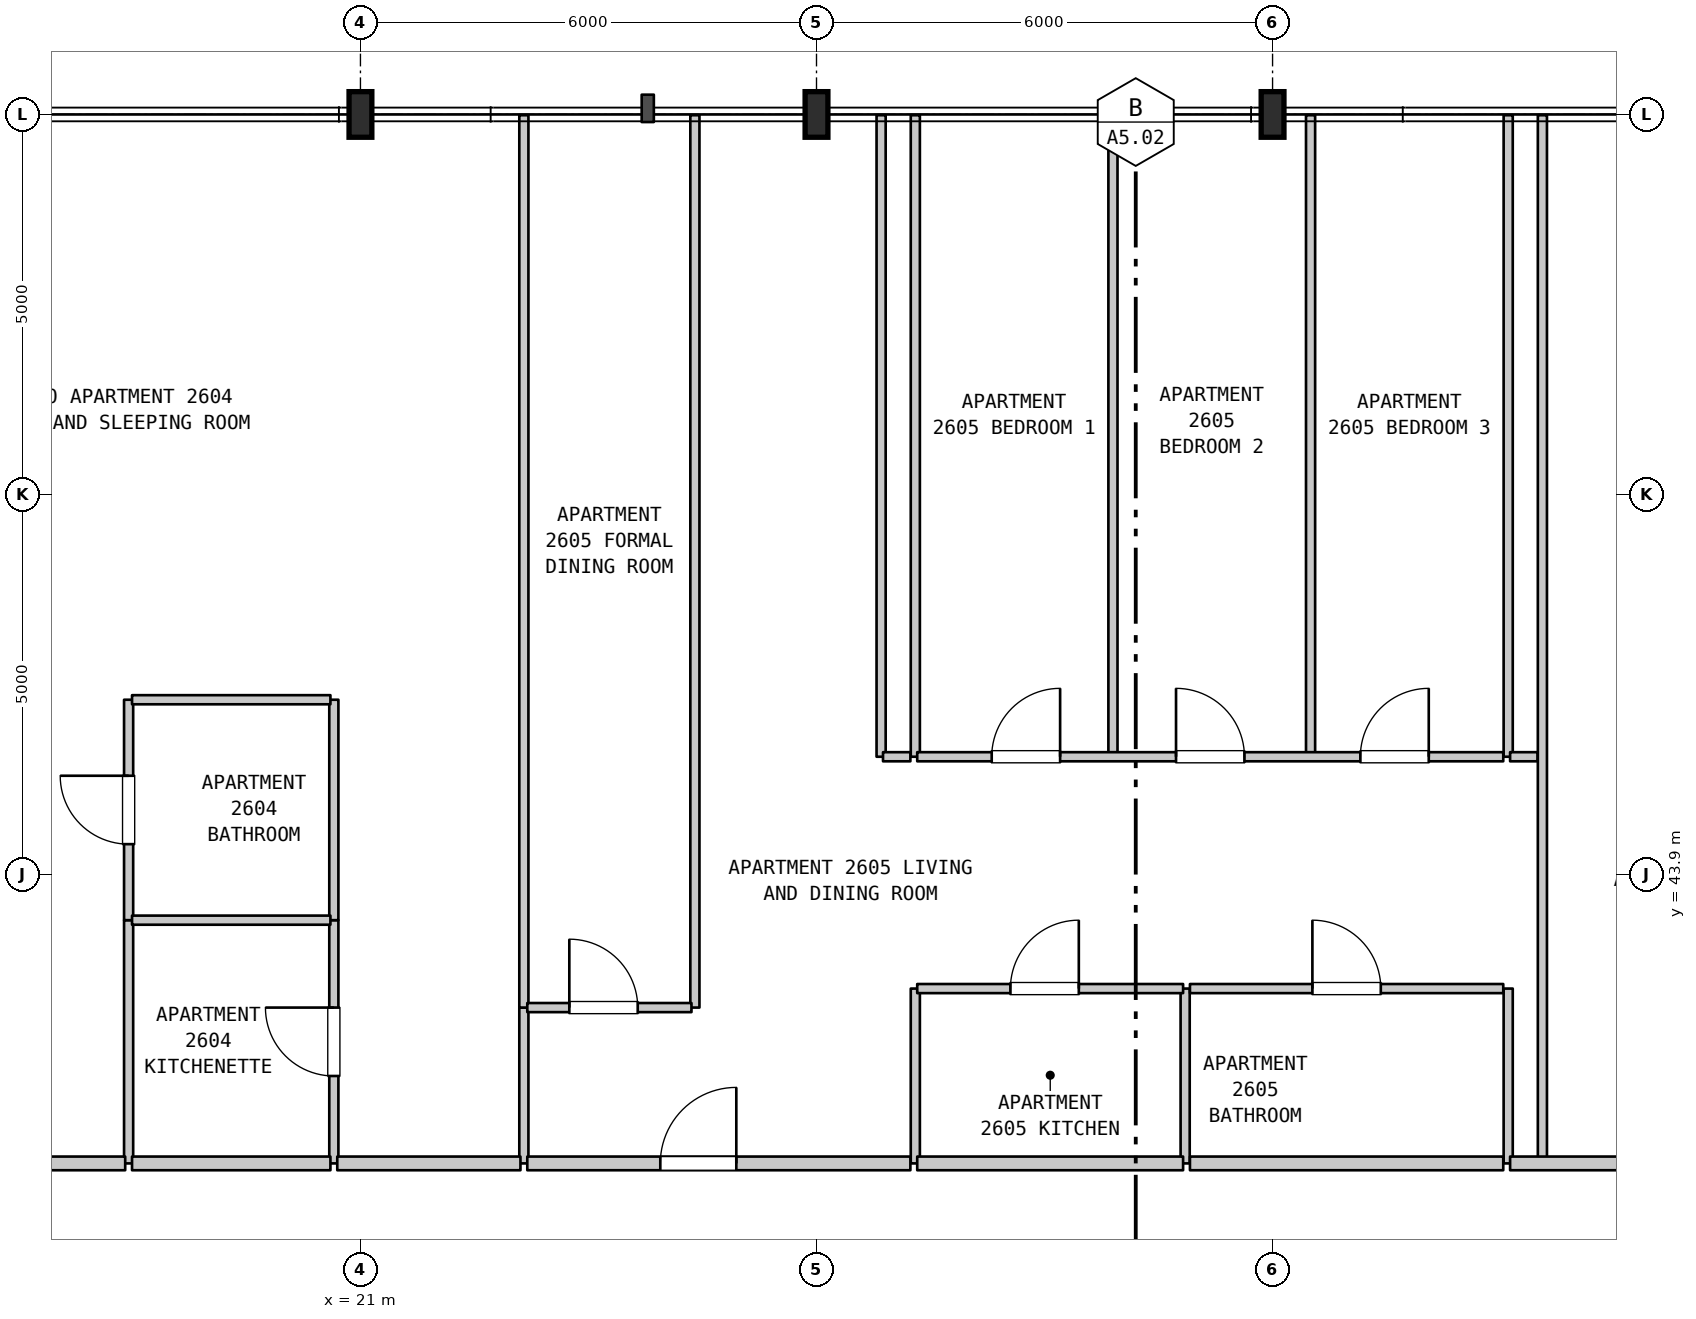
"""IFC4 building model, lengths in metres.
Left out: names, types, materials, properties, quantities, classifications, styles, units other than length and angle.
Written with IfcOpenShell. Run it as: python <this file> out.ifc"""

import sys

from ifc_helpers import new_model, si_unit, direction, frame, frame_2d, origin, origin_2d, place, context, subcontext, project, spatial, rectangle, i_section, extrude, element, fill, save


model = new_model("IFC4")
c1 = context("Model", 3, precision=1e-05, world=origin(), true_north=direction((0.0, 1.0)))
c2 = subcontext(c1, "Body", "Model", "MODEL_VIEW")
j1 = project(units=[si_unit("LENGTHUNIT", "METRE"), si_unit("PLANEANGLEUNIT", "RADIAN")], contexts=[c1])
p1 = place(None, origin())
s1 = spatial("IfcSite", under=j1, at=p1, CompositionType="ELEMENT")
p2 = place(p1, origin())
s2 = spatial("IfcBuilding", under=s1, at=p2, CompositionType="ELEMENT")
p3 = place(p2, frame((0.0, 0.0, 109.4)))
s3 = spatial("IfcBuildingStorey", under=s2, at=p3, CompositionType="ELEMENT", Elevation=109.4)
for number, where, z_axis, x_axis in (
    (1, (21.0, 53.9, 0.0), (0.0, 0.0, 1.0), (1.0, 0.0, 0.0)),
    (2, (27.0, 53.9, 0.0), (0.0, 0.0, 1.0), (1.0, 0.0, 0.0)),
    (3, (33.0, 53.9, 0.0), (0.0, 0.0, 1.0), (1.0, 0.0, 0.0)),
):
    element("IfcColumn", number, at=place(p3, frame(where, z_axis=z_axis, x_axis=x_axis)), inside=s3, PredefinedType="COLUMN", context=c2, shape_type="SweptSolid", body=[
        extrude(i_section(OverallWidth=0.3, OverallDepth=0.6, WebThickness=0.015, FlangeThickness=0.03, FilletRadius=0.027, at=origin_2d()), origin(), (0.0, 0.0, 1.0), 3.7),
    ])
p4 = place(p3, frame((17.95, 40.1, 0.0), z_axis=(0.0, 0.0, 1.0), x_axis=(0.0, 1.0, 0.0)))
e4 = element("IfcWall", 4, at=p4, inside=s3, PredefinedType="PARTITIONING", context=c2, shape_type="SweptSolid", body=[
    extrude(rectangle(XDim=3.2, YDim=0.12, at=frame_2d((1.6, 0.0))), origin(), (0.0, 0.0, 1.0), 3.385),
])
p5 = place(p3, frame((17.95, 43.3, 0.0), z_axis=(0.0, 0.0, 1.0), x_axis=(0.0, 1.0, 0.0)))
e5 = element("IfcWall", 5, at=p5, inside=s3, PredefinedType="PARTITIONING", context=c2, shape_type="SweptSolid", body=[
    extrude(rectangle(XDim=2.9, YDim=0.12, at=frame_2d((1.45, 0.0))), origin(), (0.0, 0.0, 1.0), 3.385),
])
p6 = place(p5, frame((1.0, 0.0, 0.0)))
e6 = element("IfcOpeningElement", 6, at=p6, cuts=e5, PredefinedType="OPENING", context=c2, shape_type="SweptSolid", body=[
    extrude(rectangle(XDim=0.9, YDim=2.1, at=frame_2d((0.45, 1.05))), frame((0.0, 0.07, 0.0), z_axis=(0.0, -1.0, 0.0), x_axis=(1.0, 0.0, 0.0)), (0.0, 0.0, 1.0), 0.14),
])
p7 = place(p3, frame((20.65, 40.1, 0.0), z_axis=(0.0, 0.0, 1.0), x_axis=(0.0, 1.0, 0.0)))
e7 = element("IfcWall", 7, at=p7, inside=s3, PredefinedType="PARTITIONING", context=c2, shape_type="SweptSolid", body=[
    extrude(rectangle(XDim=3.2, YDim=0.12, at=frame_2d((1.6, 0.0))), origin(), (0.0, 0.0, 1.0), 3.385),
])
p8 = place(p7, frame((1.15, 0.0, 0.0)))
e8 = element("IfcOpeningElement", 8, at=p8, cuts=e7, PredefinedType="OPENING", context=c2, shape_type="SweptSolid", body=[
    extrude(rectangle(XDim=0.9, YDim=2.15, at=frame_2d((0.45, 1.075))), frame((0.0, 0.07, 0.0), z_axis=(0.0, -1.0, 0.0), x_axis=(1.0, 0.0, 0.0)), (0.0, 0.0, 1.0), 0.14),
])
p9 = place(p3, frame((20.65, 43.3, 0.0), z_axis=(0.0, 0.0, 1.0), x_axis=(0.0, 1.0, 0.0)))
e9 = element("IfcWall", 9, at=p9, inside=s3, PredefinedType="PARTITIONING", context=c2, shape_type="SweptSolid", body=[
    extrude(rectangle(XDim=2.9, YDim=0.12, at=frame_2d((1.45, 0.0))), origin(), (0.0, 0.0, 1.0), 3.385),
])
p10 = place(p3, frame((23.15, 40.1, 0.0), z_axis=(0.0, 0.0, 1.0), x_axis=(0.0, 1.0, 0.0)))
e10 = element("IfcWall", 10, at=p10, inside=s3, PredefinedType="PARTITIONING", context=c2, shape_type="SweptSolid", body=[
    extrude(rectangle(XDim=2.05, YDim=0.12, at=frame_2d((1.025, 0.0))), origin(), (0.0, 0.0, 1.0), 3.385),
])
for number, where, z_axis, x_axis in (
    (11, (23.15, 42.15, 0.0), (0.0, 0.0, 1.0), (0.0, 1.0, 0.0)),
    (12, (25.4, 42.15, 0.0), (0.0, 0.0, 1.0), (0.0, 1.0, 0.0)),
):
    element("IfcWall", number, at=place(p3, frame(where, z_axis=z_axis, x_axis=x_axis)), inside=s3, PredefinedType="PARTITIONING", context=c2, shape_type="SweptSolid", body=[
        extrude(rectangle(XDim=11.74, YDim=0.12, at=frame_2d((5.87, 0.0))), origin(), (0.0, 0.0, 1.0), 3.385),
    ])
p11 = place(p3, frame((27.85, 45.45, 0.0), z_axis=(0.0, 0.0, 1.0), x_axis=(0.0, 1.0, 0.0)))
e13 = element("IfcWall", 13, at=p11, inside=s3, PredefinedType="PARTITIONING", context=c2, shape_type="SweptSolid", body=[
    extrude(rectangle(XDim=8.44, YDim=0.12, at=frame_2d((4.22, 0.0))), origin(), (0.0, 0.0, 1.0), 3.385),
])
p12 = place(p3, frame((28.3, 40.1, 0.0), z_axis=(0.0, 0.0, 1.0), x_axis=(0.0, 1.0, 0.0)))
e14 = element("IfcWall", 14, at=p12, inside=s3, PredefinedType="PARTITIONING", context=c2, shape_type="SweptSolid", body=[
    extrude(rectangle(XDim=2.3, YDim=0.12, at=frame_2d((1.15, 0.0))), origin(), (0.0, 0.0, 1.0), 3.385),
])
for number, where, z_axis, x_axis in (
    (15, (28.3, 45.45, 0.0), (0.0, 0.0, 1.0), (0.0, 1.0, 0.0)),
    (16, (30.9, 45.45, 0.0), (0.0, 0.0, 1.0), (0.0, 1.0, 0.0)),
):
    element("IfcWall", number, at=place(p3, frame(where, z_axis=z_axis, x_axis=x_axis)), inside=s3, PredefinedType="PARTITIONING", context=c2, shape_type="SweptSolid", body=[
        extrude(rectangle(XDim=8.44, YDim=0.12, at=frame_2d((4.22, 0.0))), origin(), (0.0, 0.0, 1.0), 3.385),
    ])
p13 = place(p3, frame((31.85, 40.1, 0.0), z_axis=(0.0, 0.0, 1.0), x_axis=(0.0, 1.0, 0.0)))
e17 = element("IfcWall", 17, at=p13, inside=s3, PredefinedType="PARTITIONING", context=c2, shape_type="SweptSolid", body=[
    extrude(rectangle(XDim=2.3, YDim=0.12, at=frame_2d((1.15, 0.0))), origin(), (0.0, 0.0, 1.0), 3.385),
])
p14 = place(p3, frame((33.5, 45.45, 0.0), z_axis=(0.0, 0.0, 1.0), x_axis=(0.0, 1.0, 0.0)))
e18 = element("IfcWall", 18, at=p14, inside=s3, PredefinedType="PARTITIONING", context=c2, shape_type="SweptSolid", body=[
    extrude(rectangle(XDim=8.44, YDim=0.12, at=frame_2d((4.22, 0.0))), origin(), (0.0, 0.0, 1.0), 3.385),
])
p15 = place(p3, frame((36.1, 40.1, 0.0), z_axis=(0.0, 0.0, 1.0), x_axis=(0.0, 1.0, 0.0)))
e19 = element("IfcWall", 19, at=p15, inside=s3, PredefinedType="PARTITIONING", context=c2, shape_type="SweptSolid", body=[
    extrude(rectangle(XDim=2.3, YDim=0.12, at=frame_2d((1.15, 0.0))), origin(), (0.0, 0.0, 1.0), 3.385),
])
p16 = place(p3, frame((36.1, 45.45, 0.0), z_axis=(0.0, 0.0, 1.0), x_axis=(0.0, 1.0, 0.0)))
e20 = element("IfcWall", 20, at=p16, inside=s3, PredefinedType="PARTITIONING", context=c2, shape_type="SweptSolid", body=[
    extrude(rectangle(XDim=8.44, YDim=0.12, at=frame_2d((4.22, 0.0))), origin(), (0.0, 0.0, 1.0), 3.385),
])
p17 = place(p3, frame((36.55, 40.1, 0.0), z_axis=(0.0, 0.0, 1.0), x_axis=(0.0, 1.0, 0.0)))
e21 = element("IfcWall", 21, at=p17, inside=s3, PredefinedType="PARTITIONING", context=c2, shape_type="SweptSolid", body=[
    extrude(rectangle(XDim=13.79, YDim=0.12, at=frame_2d((6.895, 0.0))), origin(), (0.0, 0.0, 1.0), 3.385),
])
p18 = place(p3, frame((12.875, 40.1, 0.0), z_axis=(0.0, 0.0, 1.0), x_axis=(1.0, 0.0, 0.0)))
e22 = element("IfcWall", 22, at=p18, inside=s3, PredefinedType="STANDARD", context=c2, shape_type="SweptSolid", body=[
    extrude(rectangle(XDim=5.03, YDim=0.18, at=frame_2d((2.515, 0.0))), origin(), (0.0, 0.0, 1.0), 3.385),
])
p19 = place(p18, frame((2.0, 0.0, 0.0)))
e23 = element("IfcOpeningElement", 23, at=p19, cuts=e22, PredefinedType="OPENING", context=c2, shape_type="SweptSolid", body=[
    extrude(rectangle(XDim=1.0, YDim=2.15, at=frame_2d((0.5, 1.075))), frame((0.0, 0.1, 0.0), z_axis=(0.0, -1.0, 0.0), x_axis=(1.0, 0.0, 0.0)), (0.0, 0.0, 1.0), 0.2),
])
p20 = place(p3, frame((17.995, 40.1, 0.0), z_axis=(0.0, 0.0, 1.0), x_axis=(1.0, 0.0, 0.0)))
e24 = element("IfcWall", 24, at=p20, inside=s3, PredefinedType="STANDARD", context=c2, shape_type="SweptSolid", body=[
    extrude(rectangle(XDim=2.61, YDim=0.18, at=frame_2d((1.305, 0.0))), origin(), (0.0, 0.0, 1.0), 3.385),
])
p21 = place(p3, frame((20.695, 40.1, 0.0), z_axis=(0.0, 0.0, 1.0), x_axis=(1.0, 0.0, 0.0)))
e25 = element("IfcWall", 25, at=p21, inside=s3, PredefinedType="STANDARD", context=c2, shape_type="SweptSolid", body=[
    extrude(rectangle(XDim=2.41, YDim=0.18, at=frame_2d((1.205, 0.0))), origin(), (0.0, 0.0, 1.0), 3.385),
])
p22 = place(p3, frame((23.195, 40.1, 0.0), z_axis=(0.0, 0.0, 1.0), x_axis=(1.0, 0.0, 0.0)))
e26 = element("IfcWall", 26, at=p22, inside=s3, PredefinedType="STANDARD", context=c2, shape_type="SweptSolid", body=[
    extrude(rectangle(XDim=5.04, YDim=0.18, at=frame_2d((2.52, 0.0))), origin(), (0.0, 0.0, 1.0), 3.385),
])
p23 = place(p22, frame((1.75, 0.0, 0.0)))
e27 = element("IfcOpeningElement", 27, at=p23, cuts=e26, PredefinedType="OPENING", context=c2, shape_type="SweptSolid", body=[
    extrude(rectangle(XDim=1.0, YDim=2.15, at=frame_2d((0.5, 1.075))), frame((0.0, 0.1, 0.0), z_axis=(0.0, -1.0, 0.0), x_axis=(1.0, 0.0, 0.0)), (0.0, 0.0, 1.0), 0.2),
])
p24 = place(p3, frame((28.325, 40.1, 0.0), z_axis=(0.0, 0.0, 1.0), x_axis=(1.0, 0.0, 0.0)))
e28 = element("IfcWall", 28, at=p24, inside=s3, PredefinedType="STANDARD", context=c2, shape_type="SweptSolid", body=[
    extrude(rectangle(XDim=3.498, YDim=0.18, at=frame_2d((1.749, 0.0))), origin(), (0.0, 0.0, 1.0), 3.385),
])
p25 = place(p3, frame((31.913, 40.1, 0.0), z_axis=(0.0, 0.0, 1.0), x_axis=(1.0, 0.0, 0.0)))
e29 = element("IfcWall", 29, at=p25, inside=s3, PredefinedType="STANDARD", context=c2, shape_type="SweptSolid", body=[
    extrude(rectangle(XDim=4.122, YDim=0.18, at=frame_2d((2.061, 0.0))), origin(), (0.0, 0.0, 1.0), 3.385),
])
p26 = place(p3, frame((36.125, 40.1, 0.0), z_axis=(0.0, 0.0, 1.0), x_axis=(1.0, 0.0, 0.0)))
e30 = element("IfcWall", 30, at=p26, inside=s3, PredefinedType="STANDARD", context=c2, shape_type="SweptSolid", body=[
    extrude(rectangle(XDim=5.14, YDim=0.18, at=frame_2d((2.57, 0.0))), origin(), (0.0, 0.0, 1.0), 3.385),
])
p27 = place(p26, frame((2.198, 0.0, 0.0)))
e31 = element("IfcOpeningElement", 31, at=p27, cuts=e30, PredefinedType="OPENING", context=c2, shape_type="SweptSolid", body=[
    extrude(rectangle(XDim=1.0, YDim=2.15, at=frame_2d((0.5, 1.075))), frame((0.0, 0.1, 0.0), z_axis=(0.0, -1.0, 0.0), x_axis=(1.0, 0.0, 0.0)), (0.0, 0.0, 1.0), 0.2),
])
p28 = place(p3, frame((23.195, 42.15, 0.0), z_axis=(0.0, 0.0, 1.0), x_axis=(1.0, 0.0, 0.0)))
e32 = element("IfcWall", 32, at=p28, inside=s3, PredefinedType="PARTITIONING", context=c2, shape_type="SweptSolid", body=[
    extrude(rectangle(XDim=2.16, YDim=0.12, at=frame_2d((1.08, 0.0))), origin(), (0.0, 0.0, 1.0), 3.385),
])
p29 = place(p28, frame((0.553, 0.0, 0.0)))
e33 = element("IfcOpeningElement", 33, at=p29, cuts=e32, PredefinedType="OPENING", context=c2, shape_type="SweptSolid", body=[
    extrude(rectangle(XDim=0.9, YDim=2.15, at=frame_2d((0.45, 1.075))), frame((0.0, 0.07, 0.0), z_axis=(0.0, -1.0, 0.0), x_axis=(1.0, 0.0, 0.0)), (0.0, 0.0, 1.0), 0.14),
])
p30 = place(p3, frame((28.325, 42.4, 0.0), z_axis=(0.0, 0.0, 1.0), x_axis=(1.0, 0.0, 0.0)))
e34 = element("IfcWall", 34, at=p30, inside=s3, PredefinedType="PARTITIONING", context=c2, shape_type="SweptSolid", body=[
    extrude(rectangle(XDim=3.498, YDim=0.12, at=frame_2d((1.749, 0.0))), origin(), (0.0, 0.0, 1.0), 3.385),
])
p31 = place(p30, frame((1.226, 0.0, 0.0)))
e35 = element("IfcOpeningElement", 35, at=p31, cuts=e34, PredefinedType="OPENING", context=c2, shape_type="SweptSolid", body=[
    extrude(rectangle(XDim=0.9, YDim=2.15, at=frame_2d((0.45, 1.075))), frame((0.0, 0.07, 0.0), z_axis=(0.0, -1.0, 0.0), x_axis=(1.0, 0.0, 0.0)), (0.0, 0.0, 1.0), 0.14),
])
p32 = place(p3, frame((31.913, 42.4, 0.0), z_axis=(0.0, 0.0, 1.0), x_axis=(1.0, 0.0, 0.0)))
e36 = element("IfcWall", 36, at=p32, inside=s3, PredefinedType="PARTITIONING", context=c2, shape_type="SweptSolid", body=[
    extrude(rectangle(XDim=4.122, YDim=0.12, at=frame_2d((2.061, 0.0))), origin(), (0.0, 0.0, 1.0), 3.385),
])
p33 = place(p32, frame((1.611, 0.0, 0.0)))
e37 = element("IfcOpeningElement", 37, at=p33, cuts=e36, PredefinedType="OPENING", context=c2, shape_type="SweptSolid", body=[
    extrude(rectangle(XDim=0.9, YDim=2.1, at=frame_2d((0.45, 1.05))), frame((0.0, 0.07, 0.0), z_axis=(0.0, -1.0, 0.0), x_axis=(1.0, 0.0, 0.0)), (0.0, 0.0, 1.0), 0.14),
])
p34 = place(p3, frame((17.995, 43.3, 0.0), z_axis=(0.0, 0.0, 1.0), x_axis=(1.0, 0.0, 0.0)))
e38 = element("IfcWall", 38, at=p34, inside=s3, PredefinedType="PARTITIONING", context=c2, shape_type="SweptSolid", body=[
    extrude(rectangle(XDim=2.61, YDim=0.12, at=frame_2d((1.305, 0.0))), origin(), (0.0, 0.0, 1.0), 3.385),
])
p35 = place(p3, frame((27.875, 45.45, 0.0), z_axis=(0.0, 0.0, 1.0), x_axis=(1.0, 0.0, 0.0)))
e39 = element("IfcWall", 39, at=p35, inside=s3, PredefinedType="PARTITIONING", context=c2, shape_type="SweptSolid", body=[
    extrude(rectangle(XDim=0.36, YDim=0.12, at=frame_2d((0.18, 0.0))), origin(), (0.0, 0.0, 1.0), 3.385),
])
p36 = place(p3, frame((28.325, 45.45, 0.0), z_axis=(0.0, 0.0, 1.0), x_axis=(1.0, 0.0, 0.0)))
e40 = element("IfcWall", 40, at=p36, inside=s3, PredefinedType="PARTITIONING", context=c2, shape_type="SweptSolid", body=[
    extrude(rectangle(XDim=7.71, YDim=0.12, at=frame_2d((3.855, 0.0))), origin(), (0.0, 0.0, 1.0), 3.385),
])
p37 = place(p36, frame((0.98, 0.0, 0.0)))
e41 = element("IfcOpeningElement", 41, at=p37, cuts=e40, PredefinedType="OPENING", context=c2, shape_type="SweptSolid", body=[
    extrude(rectangle(XDim=0.9, YDim=2.15, at=frame_2d((0.45, 1.075))), frame((0.0, 0.07, 0.0), z_axis=(0.0, -1.0, 0.0), x_axis=(1.0, 0.0, 0.0)), (0.0, 0.0, 1.0), 0.14),
])
p38 = place(p36, frame((3.405, 0.0, 0.0)))
e42 = element("IfcOpeningElement", 42, at=p38, cuts=e40, PredefinedType="OPENING", context=c2, shape_type="SweptSolid", body=[
    extrude(rectangle(XDim=0.9, YDim=2.15, at=frame_2d((0.45, 1.075))), frame((0.0, 0.07, 0.0), z_axis=(0.0, -1.0, 0.0), x_axis=(1.0, 0.0, 0.0)), (0.0, 0.0, 1.0), 0.14),
])
p39 = place(p36, frame((5.83, 0.0, 0.0)))
e43 = element("IfcOpeningElement", 43, at=p39, cuts=e40, PredefinedType="OPENING", context=c2, shape_type="SweptSolid", body=[
    extrude(rectangle(XDim=0.9, YDim=2.15, at=frame_2d((0.45, 1.075))), frame((0.0, 0.07, 0.0), z_axis=(0.0, -1.0, 0.0), x_axis=(1.0, 0.0, 0.0)), (0.0, 0.0, 1.0), 0.14),
])
p40 = place(p3, frame((36.125, 45.45, 0.0), z_axis=(0.0, 0.0, 1.0), x_axis=(1.0, 0.0, 0.0)))
e44 = element("IfcWall", 44, at=p40, inside=s3, PredefinedType="PARTITIONING", context=c2, shape_type="SweptSolid", body=[
    extrude(rectangle(XDim=0.36, YDim=0.12, at=frame_2d((0.18, 0.0))), origin(), (0.0, 0.0, 1.0), 3.385),
])
p41 = place(p3, frame((17.995, 46.2, 0.0), z_axis=(0.0, 0.0, 1.0), x_axis=(1.0, 0.0, 0.0)))
e45 = element("IfcWall", 45, at=p41, inside=s3, PredefinedType="PARTITIONING", context=c2, shape_type="SweptSolid", body=[
    extrude(rectangle(XDim=2.61, YDim=0.12, at=frame_2d((1.305, 0.0))), origin(), (0.0, 0.0, 1.0), 3.385),
])
p42 = place(p6, origin())
e46 = element("IfcDoor", 46, at=p42, inside=s3, OperationType="SINGLE_SWING_RIGHT", PredefinedType="DOOR", context=c2, shape_type="SweptSolid", body=[
    extrude(rectangle(XDim=0.9, YDim=2.1, at=frame_2d((0.45, 1.05))), frame((0.0, 0.025, 0.0), z_axis=(0.0, -1.0, 0.0), x_axis=(1.0, 0.0, 0.0)), (0.0, 0.0, 1.0), 0.05),
])
fill(e6, e46)
p43 = place(p8, origin())
e47 = element("IfcDoor", 47, at=p43, inside=s3, OperationType="SINGLE_SWING_RIGHT", PredefinedType="DOOR", context=c2, shape_type="SweptSolid", body=[
    extrude(rectangle(XDim=0.9, YDim=2.15, at=frame_2d((0.45, 1.075))), frame((0.0, 0.025, 0.0), z_axis=(0.0, -1.0, 0.0), x_axis=(1.0, 0.0, 0.0)), (0.0, 0.0, 1.0), 0.05),
])
fill(e8, e47)
p44 = place(p23, origin())
e48 = element("IfcDoor", 48, at=p44, inside=s3, OperationType="SINGLE_SWING_RIGHT", PredefinedType="DOOR", context=c2, shape_type="SweptSolid", body=[
    extrude(rectangle(XDim=1.0, YDim=2.15, at=frame_2d((0.5, 1.075))), frame((0.0, 0.025, 0.0), z_axis=(0.0, -1.0, 0.0), x_axis=(1.0, 0.0, 0.0)), (0.0, 0.0, 1.0), 0.05),
])
fill(e27, e48)
p45 = place(p29, origin())
e49 = element("IfcDoor", 49, at=p45, inside=s3, OperationType="SINGLE_SWING_LEFT", PredefinedType="DOOR", context=c2, shape_type="SweptSolid", body=[
    extrude(rectangle(XDim=0.9, YDim=2.15, at=frame_2d((0.45, 1.075))), frame((0.0, 0.025, 0.0), z_axis=(0.0, -1.0, 0.0), x_axis=(1.0, 0.0, 0.0)), (0.0, 0.0, 1.0), 0.05),
])
fill(e33, e49)
p46 = place(p31, origin())
e50 = element("IfcDoor", 50, at=p46, inside=s3, OperationType="SINGLE_SWING_RIGHT", PredefinedType="DOOR", context=c2, shape_type="SweptSolid", body=[
    extrude(rectangle(XDim=0.9, YDim=2.15, at=frame_2d((0.45, 1.075))), frame((0.0, 0.025, 0.0), z_axis=(0.0, -1.0, 0.0), x_axis=(1.0, 0.0, 0.0)), (0.0, 0.0, 1.0), 0.05),
])
fill(e35, e50)
p47 = place(p33, origin())
e51 = element("IfcDoor", 51, at=p47, inside=s3, OperationType="SINGLE_SWING_LEFT", PredefinedType="DOOR", context=c2, shape_type="SweptSolid", body=[
    extrude(rectangle(XDim=0.9, YDim=2.1, at=frame_2d((0.45, 1.05))), frame((0.0, 0.025, 0.0), z_axis=(0.0, -1.0, 0.0), x_axis=(1.0, 0.0, 0.0)), (0.0, 0.0, 1.0), 0.05),
])
fill(e37, e51)
p48 = place(p37, origin())
e52 = element("IfcDoor", 52, at=p48, inside=s3, OperationType="SINGLE_SWING_RIGHT", PredefinedType="DOOR", context=c2, shape_type="SweptSolid", body=[
    extrude(rectangle(XDim=0.9, YDim=2.15, at=frame_2d((0.45, 1.075))), frame((0.0, 0.025, 0.0), z_axis=(0.0, -1.0, 0.0), x_axis=(1.0, 0.0, 0.0)), (0.0, 0.0, 1.0), 0.05),
])
fill(e41, e52)
p49 = place(p38, origin())
e53 = element("IfcDoor", 53, at=p49, inside=s3, OperationType="SINGLE_SWING_LEFT", PredefinedType="DOOR", context=c2, shape_type="SweptSolid", body=[
    extrude(rectangle(XDim=0.9, YDim=2.15, at=frame_2d((0.45, 1.075))), frame((0.0, 0.025, 0.0), z_axis=(0.0, -1.0, 0.0), x_axis=(1.0, 0.0, 0.0)), (0.0, 0.0, 1.0), 0.05),
])
fill(e42, e53)
p50 = place(p39, origin())
e54 = element("IfcDoor", 54, at=p50, inside=s3, OperationType="SINGLE_SWING_RIGHT", PredefinedType="DOOR", context=c2, shape_type="SweptSolid", body=[
    extrude(rectangle(XDim=0.9, YDim=2.15, at=frame_2d((0.45, 1.075))), frame((0.0, 0.025, 0.0), z_axis=(0.0, -1.0, 0.0), x_axis=(1.0, 0.0, 0.0)), (0.0, 0.0, 1.0), 0.05),
])
fill(e43, e54)
save(model, sys.argv[1])
